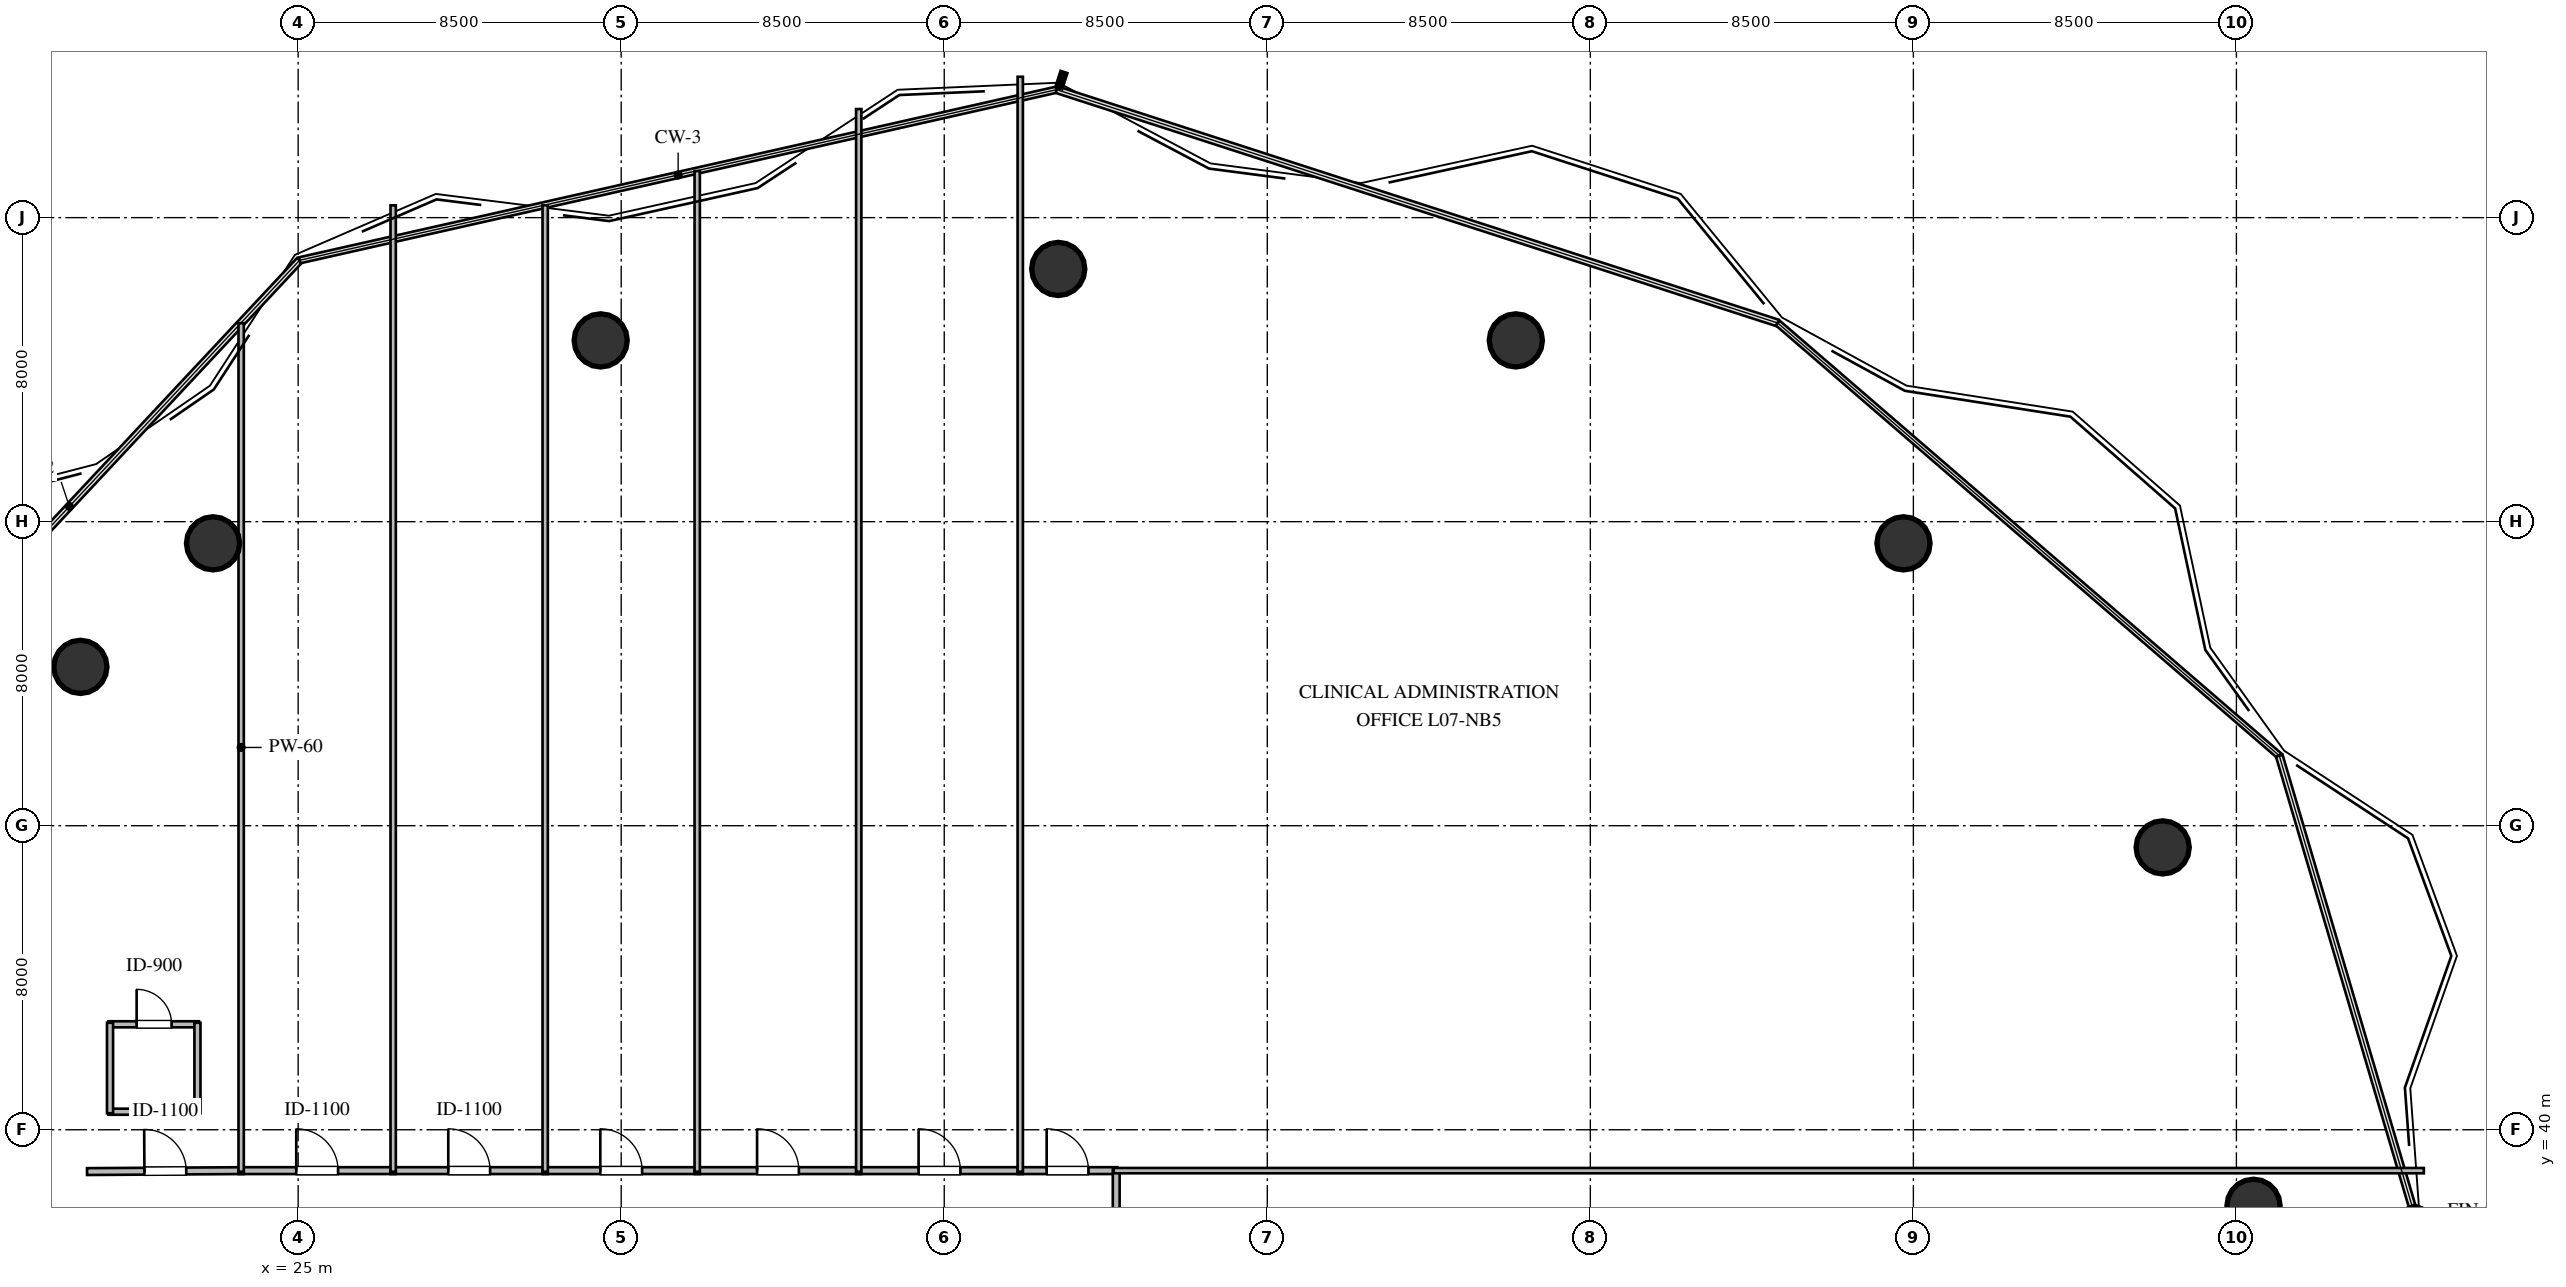
"""IFC4 building model, lengths in metres.
Left out: names, types, materials, properties, quantities, classifications, styles, units other than length and angle.
Written with IfcOpenShell. Run it as: python <this file> out.ifc"""

import sys

from ifc_helpers import new_model, si_unit, direction, frame, frame_2d, origin, origin_2d, place, context, subcontext, project, spatial, rectangle, circle, extrude, element, fill, save


model = new_model("IFC4")
c1 = context("Model", 3, precision=1e-05, world=origin(), true_north=direction((0.0, 1.0)))
c2 = subcontext(c1, "Body", "Model", "MODEL_VIEW")
j1 = project(units=[si_unit("LENGTHUNIT", "METRE"), si_unit("PLANEANGLEUNIT", "RADIAN")], contexts=[c1])
p1 = place(None, origin())
s1 = spatial("IfcSite", under=j1, at=p1, CompositionType="ELEMENT")
p2 = place(p1, origin())
s2 = spatial("IfcBuilding", under=s1, at=p2, CompositionType="ELEMENT")
p3 = place(p2, frame((0.0, 0.0, 31.2)))
s3 = spatial("IfcBuildingStorey", under=s2, at=p3, CompositionType="ELEMENT", Elevation=31.2)
for number, where, z_axis, x_axis in (
    (1, (76.45, 38.0, 0.0), (0.0, 0.0, 1.0), (1.0, 0.0, 0.0)),
    (2, (74.06, 47.43, 0.0), (0.0, 0.0, 1.0), (1.0, 0.0, 0.0)),
    (3, (67.24, 55.43, 0.0), (0.0, 0.0, 1.0), (1.0, 0.0, 0.0)),
    (4, (57.04, 60.77, 0.0), (0.0, 0.0, 1.0), (1.0, 0.0, 0.0)),
    (5, (45.0, 62.65, 0.0), (0.0, 0.0, 1.0), (1.0, 0.0, 0.0)),
    (6, (32.96, 60.77, 0.0), (0.0, 0.0, 1.0), (1.0, 0.0, 0.0)),
    (7, (22.76, 55.43, 0.0), (0.0, 0.0, 1.0), (1.0, 0.0, 0.0)),
    (8, (19.27, 52.18, 0.0), (0.0, 0.0, 1.0), (1.0, 0.0, 0.0)),
):
    element("IfcColumn", number, at=place(p3, frame(where, z_axis=z_axis, x_axis=x_axis)), inside=s3, PredefinedType="COLUMN", context=c2, shape_type="SweptSolid", body=[
        extrude(circle(Radius=0.7, at=origin_2d()), origin(), (0.0, 0.0, 1.0), 3.6),
    ])
p4 = place(p3, frame((20.01, 40.475, 0.0), z_axis=(0.0, 0.0, 1.0), x_axis=(1.0, 0.0, 0.0)))
e9 = element("IfcWall", 9, at=p4, inside=s3, PredefinedType="PLUMBINGWALL", context=c2, shape_type="SweptSolid", body=[
    extrude(rectangle(XDim=2.38, YDim=0.16, at=frame_2d((1.19, 0.0))), origin(), (0.0, 0.0, 1.0), 3.36),
])
p5 = place(p3, frame((20.01, 42.775, 0.0), z_axis=(0.0, 0.0, 1.0), x_axis=(1.0, 0.0, 0.0)))
e10 = element("IfcWall", 10, at=p5, inside=s3, PredefinedType="PLUMBINGWALL", context=c2, shape_type="SweptSolid", body=[
    extrude(rectangle(XDim=2.38, YDim=0.16, at=frame_2d((1.19, 0.0))), origin(), (0.0, 0.0, 1.0), 3.36),
])
p6 = place(p5, frame((0.74, 0.0, 0.0)))
e11 = element("IfcOpeningElement", 11, at=p6, cuts=e10, PredefinedType="OPENING", context=c2, shape_type="SweptSolid", body=[
    extrude(rectangle(XDim=0.92, YDim=2.1, at=frame_2d((0.46, 1.05))), frame((0.0, 0.09, 0.0), z_axis=(0.0, -1.0, 0.0), x_axis=(1.0, 0.0, 0.0)), (0.0, 0.0, 1.0), 0.18),
])
p7 = place(p3, frame((20.05, 40.435, 0.0), z_axis=(0.0, 0.0, 1.0), x_axis=(0.0, 1.0, 0.0)))
e12 = element("IfcWall", 12, at=p7, inside=s3, PredefinedType="PLUMBINGWALL", context=c2, shape_type="SweptSolid", body=[
    extrude(rectangle(XDim=2.38, YDim=0.16, at=frame_2d((1.19, 0.0))), origin(), (0.0, 0.0, 1.0), 3.36),
])
p8 = place(p3, frame((22.35, 40.435, 0.0), z_axis=(0.0, 0.0, 1.0), x_axis=(0.0, 1.0, 0.0)))
e13 = element("IfcWall", 13, at=p8, inside=s3, PredefinedType="PLUMBINGWALL", context=c2, shape_type="SweptSolid", body=[
    extrude(rectangle(XDim=2.38, YDim=0.16, at=frame_2d((1.19, 0.0))), origin(), (0.0, 0.0, 1.0), 2.89),
])
p9 = place(p3, frame((19.445, 38.9, 0.0), z_axis=(0.0, 0.0, 1.0), x_axis=(0.999981372921, 0.00610359001, 0.0)))
e14 = element("IfcWall", 14, at=p9, inside=s3, PredefinedType="PARTITIONING", context=c2, shape_type="SweptSolid", body=[
    extrude(rectangle(XDim=4.12, YDim=0.18, at=frame_2d((2.06, 0.0))), origin(), (0.0, 0.0, 1.0), 3.36),
])
p10 = place(p9, frame((1.51, 0.0, 0.0)))
e15 = element("IfcOpeningElement", 15, at=p10, cuts=e14, PredefinedType="OPENING", context=c2, shape_type="SweptSolid", body=[
    extrude(rectangle(XDim=1.1, YDim=2.1, at=frame_2d((0.55, 1.05))), frame((0.0, 0.1, 0.0), z_axis=(0.0, -1.0, 0.0), x_axis=(1.0, 0.0, 0.0)), (0.0, 0.0, 1.0), 0.2),
])
p11 = place(p3, frame((23.435, 38.925, 0.0), z_axis=(0.0, 0.0, 1.0), x_axis=(1.0, 0.0, 0.0)))
e16 = element("IfcWall", 16, at=p11, inside=s3, PredefinedType="PARTITIONING", context=c2, shape_type="SweptSolid", body=[
    extrude(rectangle(XDim=4.13, YDim=0.18, at=frame_2d((2.065, 0.0))), origin(), (0.0, 0.0, 1.0), 3.36),
])
p12 = place(p11, frame((1.515, 0.0, 0.0)))
e17 = element("IfcOpeningElement", 17, at=p12, cuts=e16, PredefinedType="OPENING", context=c2, shape_type="SweptSolid", body=[
    extrude(rectangle(XDim=1.1, YDim=2.1, at=frame_2d((0.55, 1.05))), frame((0.0, 0.1, 0.0), z_axis=(0.0, -1.0, 0.0), x_axis=(1.0, 0.0, 0.0)), (0.0, 0.0, 1.0), 0.2),
])
p13 = place(p3, frame((27.435, 38.925, 0.0), z_axis=(0.0, 0.0, 1.0), x_axis=(1.0, 0.0, 0.0)))
e18 = element("IfcWall", 18, at=p13, inside=s3, PredefinedType="PARTITIONING", context=c2, shape_type="SweptSolid", body=[
    extrude(rectangle(XDim=4.13, YDim=0.18, at=frame_2d((2.065, 0.0))), origin(), (0.0, 0.0, 1.0), 3.36),
])
p14 = place(p13, frame((1.515, 0.0, 0.0)))
e19 = element("IfcOpeningElement", 19, at=p14, cuts=e18, PredefinedType="OPENING", context=c2, shape_type="SweptSolid", body=[
    extrude(rectangle(XDim=1.1, YDim=2.1, at=frame_2d((0.55, 1.05))), frame((0.0, 0.1, 0.0), z_axis=(0.0, -1.0, 0.0), x_axis=(1.0, 0.0, 0.0)), (0.0, 0.0, 1.0), 0.2),
])
p15 = place(p3, frame((31.435, 38.925, 0.0), z_axis=(0.0, 0.0, 1.0), x_axis=(1.0, 0.0, 0.0)))
e20 = element("IfcWall", 20, at=p15, inside=s3, PredefinedType="PARTITIONING", context=c2, shape_type="SweptSolid", body=[
    extrude(rectangle(XDim=4.13, YDim=0.18, at=frame_2d((2.065, 0.0))), origin(), (0.0, 0.0, 1.0), 3.36),
])
p16 = place(p15, frame((1.515, 0.0, 0.0)))
e21 = element("IfcOpeningElement", 21, at=p16, cuts=e20, PredefinedType="OPENING", context=c2, shape_type="SweptSolid", body=[
    extrude(rectangle(XDim=1.1, YDim=2.1, at=frame_2d((0.55, 1.05))), frame((0.0, 0.1, 0.0), z_axis=(0.0, -1.0, 0.0), x_axis=(1.0, 0.0, 0.0)), (0.0, 0.0, 1.0), 0.2),
])
p17 = place(p3, frame((35.435, 38.925, 0.0), z_axis=(0.0, 0.0, 1.0), x_axis=(1.0, 0.0, 0.0)))
e22 = element("IfcWall", 22, at=p17, inside=s3, PredefinedType="PARTITIONING", context=c2, shape_type="SweptSolid", body=[
    extrude(rectangle(XDim=4.38, YDim=0.18, at=frame_2d((2.19, 0.0))), origin(), (0.0, 0.0, 1.0), 3.36),
])
p18 = place(p17, frame((1.64, 0.0, 0.0)))
e23 = element("IfcOpeningElement", 23, at=p18, cuts=e22, PredefinedType="OPENING", context=c2, shape_type="SweptSolid", body=[
    extrude(rectangle(XDim=1.1, YDim=2.1, at=frame_2d((0.55, 1.05))), frame((0.0, 0.1, 0.0), z_axis=(0.0, -1.0, 0.0), x_axis=(1.0, 0.0, 0.0)), (0.0, 0.0, 1.0), 0.2),
])
p19 = place(p3, frame((39.685, 38.925, 0.0), z_axis=(0.0, 0.0, 1.0), x_axis=(1.0, 0.0, 0.0)))
e24 = element("IfcWall", 24, at=p19, inside=s3, PredefinedType="PARTITIONING", context=c2, shape_type="SweptSolid", body=[
    extrude(rectangle(XDim=4.38, YDim=0.18, at=frame_2d((2.19, 0.0))), origin(), (0.0, 0.0, 1.0), 3.36),
])
p20 = place(p19, frame((1.64, 0.0, 0.0)))
e25 = element("IfcOpeningElement", 25, at=p20, cuts=e24, PredefinedType="OPENING", context=c2, shape_type="SweptSolid", body=[
    extrude(rectangle(XDim=1.1, YDim=2.1, at=frame_2d((0.55, 1.05))), frame((0.0, 0.1, 0.0), z_axis=(0.0, -1.0, 0.0), x_axis=(1.0, 0.0, 0.0)), (0.0, 0.0, 1.0), 0.2),
])
p21 = place(p3, frame((43.935, 38.925, 0.0), z_axis=(0.0, 0.0, 1.0), x_axis=(1.0, 0.0, 0.0)))
e26 = element("IfcWall", 26, at=p21, inside=s3, PredefinedType="PARTITIONING", context=c2, shape_type="SweptSolid", body=[
    extrude(rectangle(XDim=2.62, YDim=0.18, at=frame_2d((1.31, 0.0))), origin(), (0.0, 0.0, 1.0), 3.36),
])
p22 = place(p21, frame((0.76, 0.0, 0.0)))
e27 = element("IfcOpeningElement", 27, at=p22, cuts=e26, PredefinedType="OPENING", context=c2, shape_type="SweptSolid", body=[
    extrude(rectangle(XDim=1.1, YDim=2.1, at=frame_2d((0.55, 1.05))), frame((0.0, 0.1, 0.0), z_axis=(0.0, -1.0, 0.0), x_axis=(1.0, 0.0, 0.0)), (0.0, 0.0, 1.0), 0.2),
])
p23 = place(p3, frame((46.525, 38.955, 0.0), z_axis=(0.0, 0.0, 1.0), x_axis=(0.0, -1.0, 0.0)))
e28 = element("IfcWall", 28, at=p23, inside=s3, PredefinedType="PARTITIONING", context=c2, shape_type="SweptSolid", body=[
    extrude(rectangle(XDim=4.06, YDim=0.18, at=frame_2d((2.03, 0.0))), origin(), (0.0, 0.0, 1.0), 3.36),
])
p24 = place(p23, frame((1.48, 0.0, 0.0)))
e29 = element("IfcOpeningElement", 29, at=p24, cuts=e28, PredefinedType="OPENING", context=c2, shape_type="SweptSolid", body=[
    extrude(rectangle(XDim=1.1, YDim=2.1, at=frame_2d((0.55, 1.05))), frame((0.0, 0.1, 0.0), z_axis=(0.0, -1.0, 0.0), x_axis=(1.0, 0.0, 0.0)), (0.0, 0.0, 1.0), 0.2),
])
p25 = place(p3, frame((23.5, 61.224, 0.0), z_axis=(0.0, 0.0, 1.0), x_axis=(0.0, -1.0, 0.0)))
e30 = element("IfcWall", 30, at=p25, inside=s3, PredefinedType="PARTITIONING", context=c2, shape_type="SweptSolid", body=[
    extrude(rectangle(XDim=22.329, YDim=0.14, at=frame_2d((11.164, 0.0))), origin(), (0.0, 0.0, 1.0), 3.36),
])
p26 = place(p3, frame((27.5, 64.323, 0.0), z_axis=(0.0, 0.0, 1.0), x_axis=(0.0, -1.0, 0.0)))
e31 = element("IfcWall", 31, at=p26, inside=s3, PredefinedType="PARTITIONING", context=c2, shape_type="SweptSolid", body=[
    extrude(rectangle(XDim=25.428, YDim=0.14, at=frame_2d((12.714, 0.0))), origin(), (0.0, 0.0, 1.0), 3.36),
])
p27 = place(p3, frame((31.5, 64.324, 0.0), z_axis=(0.0, 0.0, 1.0), x_axis=(0.0, -1.0, 0.0)))
e32 = element("IfcWall", 32, at=p27, inside=s3, PredefinedType="PARTITIONING", context=c2, shape_type="SweptSolid", body=[
    extrude(rectangle(XDim=25.429, YDim=0.14, at=frame_2d((12.714, 0.0))), origin(), (0.0, 0.0, 1.0), 2.89),
])
p28 = place(p3, frame((35.5, 65.226, 0.0), z_axis=(0.0, 0.0, 1.0), x_axis=(0.0, -1.0, 0.0)))
e33 = element("IfcWall", 33, at=p28, inside=s3, PredefinedType="PARTITIONING", context=c2, shape_type="SweptSolid", body=[
    extrude(rectangle(XDim=26.331, YDim=0.14, at=frame_2d((13.165, 0.0))), origin(), (0.0, 0.0, 1.0), 3.36),
])
p29 = place(p3, frame((39.75, 66.857, 0.0), z_axis=(0.0, 0.0, 1.0), x_axis=(0.0, -1.0, 0.0)))
e34 = element("IfcWall", 34, at=p29, inside=s3, PredefinedType="PARTITIONING", context=c2, shape_type="SweptSolid", body=[
    extrude(rectangle(XDim=27.962, YDim=0.14, at=frame_2d((13.981, 0.0))), origin(), (0.0, 0.0, 1.0), 3.36),
])
p30 = place(p3, frame((44.0, 67.706, 0.0), z_axis=(0.0, 0.0, 1.0), x_axis=(0.0, -1.0, 0.0)))
e35 = element("IfcWall", 35, at=p30, inside=s3, PredefinedType="PARTITIONING", context=c2, shape_type="SweptSolid", body=[
    extrude(rectangle(XDim=28.811, YDim=0.14, at=frame_2d((14.406, 0.0))), origin(), (0.0, 0.0, 1.0), 2.89),
])
p31 = place(p3, frame((80.932, 38.925, 0.0), z_axis=(0.0, 0.0, 1.0), x_axis=(-1.0, 0.0, 0.0)))
e36 = element("IfcWall", 36, at=p31, inside=s3, PredefinedType="PARTITIONING", context=c2, shape_type="SweptSolid", body=[
    extrude(rectangle(XDim=34.472, YDim=0.14, at=frame_2d((17.236, 0.0))), origin(), (0.0, 0.0, 1.0), 3.36),
])
p32 = place(p6, origin())
e37 = element("IfcDoor", 37, at=p32, inside=s3, OperationType="SINGLE_SWING_LEFT", PredefinedType="DOOR", context=c2, shape_type="SweptSolid", body=[
    extrude(rectangle(XDim=0.92, YDim=2.1, at=frame_2d((0.46, 1.05))), frame((0.0, 0.025, 0.0), z_axis=(0.0, -1.0, 0.0), x_axis=(1.0, 0.0, 0.0)), (0.0, 0.0, 1.0), 0.05),
])
fill(e11, e37)
p33 = place(p10, origin())
e38 = element("IfcDoor", 38, at=p33, inside=s3, OperationType="SINGLE_SWING_LEFT", PredefinedType="DOOR", context=c2, shape_type="SweptSolid", body=[
    extrude(rectangle(XDim=1.1, YDim=2.1, at=frame_2d((0.55, 1.05))), frame((0.0, 0.025, 0.0), z_axis=(0.0, -1.0, 0.0), x_axis=(1.0, 0.0, 0.0)), (0.0, 0.0, 1.0), 0.05),
])
fill(e15, e38)
p34 = place(p12, origin())
e39 = element("IfcDoor", 39, at=p34, inside=s3, OperationType="SINGLE_SWING_LEFT", PredefinedType="DOOR", context=c2, shape_type="SweptSolid", body=[
    extrude(rectangle(XDim=1.1, YDim=2.1, at=frame_2d((0.55, 1.05))), frame((0.0, 0.025, 0.0), z_axis=(0.0, -1.0, 0.0), x_axis=(1.0, 0.0, 0.0)), (0.0, 0.0, 1.0), 0.05),
])
fill(e17, e39)
p35 = place(p14, origin())
e40 = element("IfcDoor", 40, at=p35, inside=s3, OperationType="SINGLE_SWING_LEFT", PredefinedType="DOOR", context=c2, shape_type="SweptSolid", body=[
    extrude(rectangle(XDim=1.1, YDim=2.1, at=frame_2d((0.55, 1.05))), frame((0.0, 0.025, 0.0), z_axis=(0.0, -1.0, 0.0), x_axis=(1.0, 0.0, 0.0)), (0.0, 0.0, 1.0), 0.05),
])
fill(e19, e40)
p36 = place(p16, origin())
e41 = element("IfcDoor", 41, at=p36, inside=s3, OperationType="SINGLE_SWING_LEFT", PredefinedType="DOOR", context=c2, shape_type="SweptSolid", body=[
    extrude(rectangle(XDim=1.1, YDim=2.1, at=frame_2d((0.55, 1.05))), frame((0.0, 0.025, 0.0), z_axis=(0.0, -1.0, 0.0), x_axis=(1.0, 0.0, 0.0)), (0.0, 0.0, 1.0), 0.05),
])
fill(e21, e41)
p37 = place(p18, origin())
e42 = element("IfcDoor", 42, at=p37, inside=s3, OperationType="SINGLE_SWING_LEFT", PredefinedType="DOOR", context=c2, shape_type="SweptSolid", body=[
    extrude(rectangle(XDim=1.1, YDim=2.1, at=frame_2d((0.55, 1.05))), frame((0.0, 0.025, 0.0), z_axis=(0.0, -1.0, 0.0), x_axis=(1.0, 0.0, 0.0)), (0.0, 0.0, 1.0), 0.05),
])
fill(e23, e42)
p38 = place(p20, origin())
e43 = element("IfcDoor", 43, at=p38, inside=s3, OperationType="SINGLE_SWING_LEFT", PredefinedType="DOOR", context=c2, shape_type="SweptSolid", body=[
    extrude(rectangle(XDim=1.1, YDim=2.1, at=frame_2d((0.55, 1.05))), frame((0.0, 0.025, 0.0), z_axis=(0.0, -1.0, 0.0), x_axis=(1.0, 0.0, 0.0)), (0.0, 0.0, 1.0), 0.05),
])
fill(e25, e43)
p39 = place(p22, origin())
e44 = element("IfcDoor", 44, at=p39, inside=s3, OperationType="SINGLE_SWING_LEFT", PredefinedType="DOOR", context=c2, shape_type="SweptSolid", body=[
    extrude(rectangle(XDim=1.1, YDim=2.1, at=frame_2d((0.55, 1.05))), frame((0.0, 0.025, 0.0), z_axis=(0.0, -1.0, 0.0), x_axis=(1.0, 0.0, 0.0)), (0.0, 0.0, 1.0), 0.05),
])
fill(e27, e44)
save(model, sys.argv[1])
